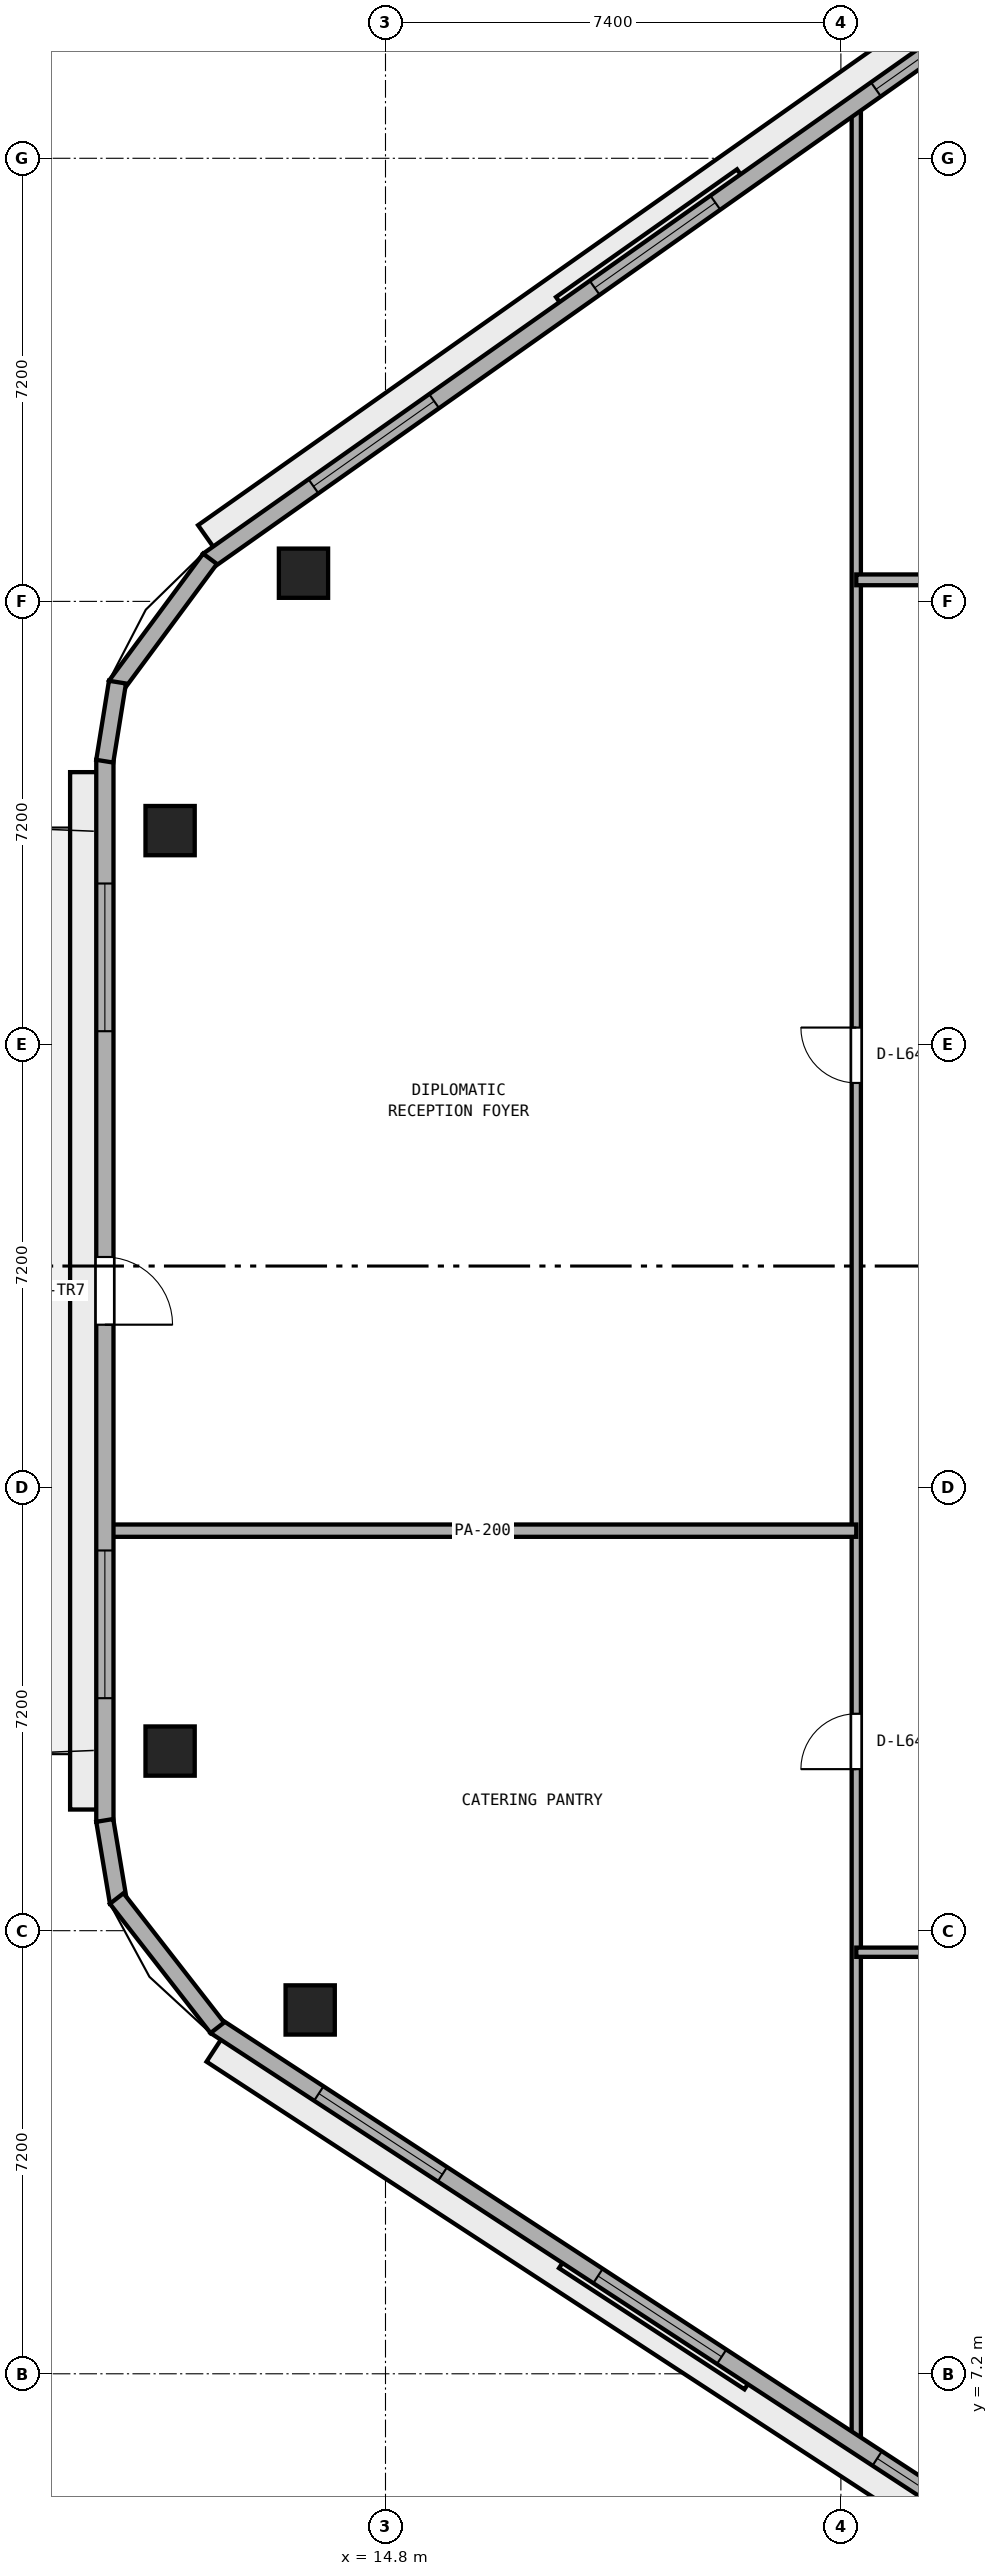
"""IFC4 building model, lengths in metres.
Left out: names, types, materials, properties, quantities, classifications, styles, units other than length and angle.
Written with IfcOpenShell. Run it as: python <this file> out.ifc"""

import sys

from ifc_helpers import new_model, si_unit, direction, frame, frame_2d, origin, origin_2d, place, context, subcontext, project, spatial, rectangle, extrude, element, fill, save


model = new_model("IFC4")
c1 = context("Model", 3, precision=1e-05, world=origin(), true_north=direction((0.0, 1.0)))
c2 = subcontext(c1, "Body", "Model", "MODEL_VIEW")
j1 = project(units=[si_unit("LENGTHUNIT", "METRE"), si_unit("PLANEANGLEUNIT", "RADIAN")], contexts=[c1])
p1 = place(None, origin())
s1 = spatial("IfcSite", under=j1, at=p1, CompositionType="ELEMENT")
p2 = place(p1, origin())
s2 = spatial("IfcBuilding", under=s1, at=p2, CompositionType="ELEMENT")
p3 = place(p2, frame((0.0, 0.0, 251.6)))
s3 = spatial("IfcBuildingStorey", under=s2, at=p3, CompositionType="ELEMENT", Elevation=251.6)
for number, where, z_axis, x_axis in (
    (1, (13.467, 36.458, 0.0), (0.0, 0.0, 1.0), (1.0, 0.0, 0.0)),
    (2, (11.3, 32.275, 0.0), (0.0, 0.0, 1.0), (1.0, 0.0, 0.0)),
    (3, (11.3, 17.319, 0.0), (0.0, 0.0, 1.0), (1.0, 0.0, 0.0)),
    (4, (13.576, 13.112, 0.0), (0.0, 0.0, 1.0), (1.0, 0.0, 0.0)),
):
    element("IfcColumn", number, at=place(p3, frame(where, z_axis=z_axis, x_axis=x_axis)), inside=s3, PredefinedType="COLUMN", context=c2, shape_type="SweptSolid", body=[
        extrude(rectangle(XDim=0.8, YDim=0.8, at=origin_2d()), origin(), (0.0, 0.0, 1.0), 3.8),
    ])
p4 = place(p3, frame((22.45, 6.02, 0.0), z_axis=(0.0, 0.0, 1.0), x_axis=(0.0, 1.0, 0.0)))
e5 = element("IfcWall", 5, at=p4, inside=s3, PredefinedType="PARTITIONING", context=c2, shape_type="SweptSolid", body=[
    extrude(rectangle(XDim=38.106, YDim=0.15, at=frame_2d((19.053, 0.0))), origin(), (0.0, 0.0, 1.0), 3.51),
])
p5 = place(p4, frame((11.005, 0.0, 0.0)))
e6 = element("IfcOpeningElement", 6, at=p5, cuts=e5, PredefinedType="OPENING", context=c2, shape_type="SweptSolid", body=[
    extrude(rectangle(XDim=0.9, YDim=2.1, at=frame_2d((0.45, 1.05))), frame((0.0, 0.085, 0.0), z_axis=(0.0, -1.0, 0.0), x_axis=(1.0, 0.0, 0.0)), (0.0, 0.0, 1.0), 0.17),
])
p6 = place(p4, frame((22.155, 0.0, 0.0)))
e7 = element("IfcOpeningElement", 7, at=p6, cuts=e5, PredefinedType="OPENING", context=c2, shape_type="SweptSolid", body=[
    extrude(rectangle(XDim=0.9, YDim=2.1, at=frame_2d((0.45, 1.05))), frame((0.0, 0.085, 0.0), z_axis=(0.0, -1.0, 0.0), x_axis=(1.0, 0.0, 0.0)), (0.0, 0.0, 1.0), 0.17),
])
p7 = place(p3, frame((22.45, 14.05, 0.0), z_axis=(0.0, 0.0, 1.0), x_axis=(1.0, 0.0, 0.0)))
e8 = element("IfcWall", 8, at=p7, inside=s3, PredefinedType="PARTITIONING", context=c2, shape_type="SweptSolid", body=[
    extrude(rectangle(XDim=13.2, YDim=0.15, at=frame_2d((6.6, 0.0))), origin(), (0.0, 0.0, 1.0), 3.51),
])
p8 = place(p7, frame((6.15, 0.0, 0.0)))
e9 = element("IfcOpeningElement", 9, at=p8, cuts=e8, PredefinedType="OPENING", context=c2, shape_type="SweptSolid", body=[
    extrude(rectangle(XDim=0.9, YDim=2.1, at=frame_2d((0.45, 1.05))), frame((0.0, 0.085, 0.0), z_axis=(0.0, -1.0, 0.0), x_axis=(1.0, 0.0, 0.0)), (0.0, 0.0, 1.0), 0.17),
])
p9 = place(p3, frame((10.305, 20.9, 0.0), z_axis=(0.0, 0.0, 1.0), x_axis=(1.0, 0.0, 0.0)))
e10 = element("IfcWall", 10, at=p9, inside=s3, PredefinedType="PARTITIONING", context=c2, shape_type="SweptSolid", body=[
    extrude(rectangle(XDim=12.145, YDim=0.2, at=frame_2d((6.073, 0.0))), origin(), (0.0, 0.0, 1.0), 3.51),
])
p10 = place(p3, frame((22.45, 36.35, 0.0), z_axis=(0.0, 0.0, 1.0), x_axis=(1.0, 0.0, 0.0)))
e11 = element("IfcWall", 11, at=p10, inside=s3, PredefinedType="PARTITIONING", context=c2, shape_type="SweptSolid", body=[
    extrude(rectangle(XDim=26.15, YDim=0.175, at=frame_2d((13.075, 0.0))), origin(), (0.0, 0.0, 1.0), 3.51),
])
p11 = place(p10, frame((12.575, 0.0, 0.0)))
e12 = element("IfcOpeningElement", 12, at=p11, cuts=e11, PredefinedType="OPENING", context=c2, shape_type="SweptSolid", body=[
    extrude(rectangle(XDim=1.0, YDim=2.12, at=frame_2d((0.5, 1.06))), frame((0.0, 0.097, 0.0), z_axis=(0.0, -1.0, 0.0), x_axis=(1.0, 0.0, 0.0)), (0.0, 0.0, 1.0), 0.195),
])
p12 = place(p3, frame((26.443, 46.913, 0.0), z_axis=(0.0, 0.0, 1.0), x_axis=(-0.817024179766, -0.576603407619, 0.0)))
e13 = element("IfcWall", 13, at=p12, inside=s3, PredefinedType="STANDARD", context=c2, shape_type="SweptSolid", body=[
    extrude(rectangle(XDim=17.78, YDim=0.28, at=frame_2d((8.89, 0.0))), origin(), (0.0, 0.0, 1.0), 3.51),
])
p13 = place(p12, frame((2.097, 0.0, 0.9)))
e14 = element("IfcOpeningElement", 14, at=p13, cuts=e13, PredefinedType="OPENING", context=c2, shape_type="SweptSolid", body=[
    extrude(rectangle(XDim=2.4, YDim=1.75, at=frame_2d((1.2, 0.875))), frame((0.0, 0.15, 0.0), z_axis=(0.0, -1.0, 0.0), x_axis=(1.0, 0.0, 0.0)), (0.0, 0.0, 1.0), 0.3),
])
p14 = place(p12, frame((7.69, 0.0, 0.9)))
e15 = element("IfcOpeningElement", 15, at=p14, cuts=e13, PredefinedType="OPENING", context=c2, shape_type="SweptSolid", body=[
    extrude(rectangle(XDim=2.4, YDim=1.75, at=frame_2d((1.2, 0.875))), frame((0.0, 0.15, 0.0), z_axis=(0.0, -1.0, 0.0), x_axis=(1.0, 0.0, 0.0)), (0.0, 0.0, 1.0), 0.3),
])
p15 = place(p12, frame((13.283, 0.0, 0.9)))
e16 = element("IfcOpeningElement", 16, at=p15, cuts=e13, PredefinedType="OPENING", context=c2, shape_type="SweptSolid", body=[
    extrude(rectangle(XDim=2.4, YDim=1.75, at=frame_2d((1.2, 0.875))), frame((0.0, 0.15, 0.0), z_axis=(0.0, -1.0, 0.0), x_axis=(1.0, 0.0, 0.0)), (0.0, 0.0, 1.0), 0.3),
])
p16 = place(p3, frame((10.24, 33.425, 0.0), z_axis=(0.0, 0.0, 1.0), x_axis=(0.0, -1.0, 0.0)))
e17 = element("IfcWall", 17, at=p16, inside=s3, PredefinedType="STANDARD", context=c2, shape_type="SweptSolid", body=[
    extrude(rectangle(XDim=17.257, YDim=0.28, at=frame_2d((8.628, 0.0))), origin(), (0.0, 0.0, 1.0), 3.51),
])
p17 = place(p16, frame((8.078, 0.0, 0.0)))
e18 = element("IfcOpeningElement", 18, at=p17, cuts=e17, PredefinedType="OPENING", context=c2, shape_type="SweptSolid", body=[
    extrude(rectangle(XDim=1.1, YDim=2.2, at=frame_2d((0.55, 1.1))), frame((0.0, 0.15, 0.0), z_axis=(0.0, -1.0, 0.0), x_axis=(1.0, 0.0, 0.0)), (0.0, 0.0, 1.0), 0.3),
])
p18 = place(p16, frame((2.01, 0.0, 0.9)))
e19 = element("IfcOpeningElement", 19, at=p18, cuts=e17, PredefinedType="OPENING", context=c2, shape_type="SweptSolid", body=[
    extrude(rectangle(XDim=2.4, YDim=1.75, at=frame_2d((1.2, 0.875))), frame((0.0, 0.15, 0.0), z_axis=(0.0, -1.0, 0.0), x_axis=(1.0, 0.0, 0.0)), (0.0, 0.0, 1.0), 0.3),
])
p19 = place(p16, frame((12.847, 0.0, 0.9)))
e20 = element("IfcOpeningElement", 20, at=p19, cuts=e17, PredefinedType="OPENING", context=c2, shape_type="SweptSolid", body=[
    extrude(rectangle(XDim=2.4, YDim=1.75, at=frame_2d((1.2, 0.875))), frame((0.0, 0.15, 0.0), z_axis=(0.0, -1.0, 0.0), x_axis=(1.0, 0.0, 0.0)), (0.0, 0.0, 1.0), 0.3),
])
p20 = place(p3, frame((12.034, 12.854, 0.0), z_axis=(0.0, 0.0, 1.0), x_axis=(0.837118352984, -0.547021812269, 0.0)))
e21 = element("IfcWall", 21, at=p20, inside=s3, PredefinedType="STANDARD", context=c2, shape_type="SweptSolid", body=[
    extrude(rectangle(XDim=17.259, YDim=0.28, at=frame_2d((8.63, 0.0))), origin(), (0.0, 0.0, 1.0), 3.51),
])
p21 = place(p20, frame((2.01, 0.0, 0.9)))
e22 = element("IfcOpeningElement", 22, at=p21, cuts=e21, PredefinedType="OPENING", context=c2, shape_type="SweptSolid", body=[
    extrude(rectangle(XDim=2.4, YDim=1.75, at=frame_2d((1.2, 0.875))), frame((0.0, 0.15, 0.0), z_axis=(0.0, -1.0, 0.0), x_axis=(1.0, 0.0, 0.0)), (0.0, 0.0, 1.0), 0.3),
])
p22 = place(p20, frame((7.43, 0.0, 0.9)))
e23 = element("IfcOpeningElement", 23, at=p22, cuts=e21, PredefinedType="OPENING", context=c2, shape_type="SweptSolid", body=[
    extrude(rectangle(XDim=2.4, YDim=1.75, at=frame_2d((1.2, 0.875))), frame((0.0, 0.15, 0.0), z_axis=(0.0, -1.0, 0.0), x_axis=(1.0, 0.0, 0.0)), (0.0, 0.0, 1.0), 0.3),
])
p23 = place(p20, frame((12.849, 0.0, 0.9)))
e24 = element("IfcOpeningElement", 24, at=p23, cuts=e21, PredefinedType="OPENING", context=c2, shape_type="SweptSolid", body=[
    extrude(rectangle(XDim=2.4, YDim=1.75, at=frame_2d((1.2, 0.875))), frame((0.0, 0.15, 0.0), z_axis=(0.0, -1.0, 0.0), x_axis=(1.0, 0.0, 0.0)), (0.0, 0.0, 1.0), 0.3),
])
p24 = place(p3, frame((11.948, 36.692, 0.0), z_axis=(0.0, 0.0, 1.0), x_axis=(-0.595170751493, -0.803599263668, 0.0)))
e25 = element("IfcWall", 25, at=p24, inside=s3, PredefinedType="STANDARD", context=c2, shape_type="SweptSolid", body=[
    extrude(rectangle(XDim=2.57, YDim=0.28, at=frame_2d((1.285, 0.0))), origin(), (0.0, 0.0, 1.0), 3.51),
])
p25 = place(p3, frame((10.445, 34.688, 0.0), z_axis=(0.0, 0.0, 1.0), x_axis=(-0.158524605336, -0.987355027081, 0.0)))
e26 = element("IfcWall", 26, at=p25, inside=s3, PredefinedType="STANDARD", context=c2, shape_type="SweptSolid", body=[
    extrude(rectangle(XDim=1.301, YDim=0.28, at=frame_2d((0.651, 0.0))), origin(), (0.0, 0.0, 1.0), 3.51),
])
p26 = place(p3, frame((10.238, 16.192, 0.0), z_axis=(0.0, 0.0, 1.0), x_axis=(0.164604311367, -0.986359681191, 0.0)))
e27 = element("IfcWall", 27, at=p26, inside=s3, PredefinedType="STANDARD", context=c2, shape_type="SweptSolid", body=[
    extrude(rectangle(XDim=1.35, YDim=0.28, at=frame_2d((0.675, 0.0))), origin(), (0.0, 0.0, 1.0), 3.51),
])
p27 = place(p3, frame((10.433, 14.923, 0.0), z_axis=(0.0, 0.0, 1.0), x_axis=(0.614181852676, -0.78916452774, 0.0)))
e28 = element("IfcWall", 28, at=p27, inside=s3, PredefinedType="STANDARD", context=c2, shape_type="SweptSolid", body=[
    extrude(rectangle(XDim=2.662, YDim=0.28, at=frame_2d((1.331, 0.0))), origin(), (0.0, 0.0, 1.0), 3.51),
])
p28 = place(p5, origin())
e29 = element("IfcDoor", 29, at=p28, inside=s3, OperationType="SINGLE_SWING_LEFT", PredefinedType="DOOR", context=c2, shape_type="SweptSolid", body=[
    extrude(rectangle(XDim=0.9, YDim=2.1, at=frame_2d((0.45, 1.05))), frame((0.0, 0.025, 0.0), z_axis=(0.0, -1.0, 0.0), x_axis=(1.0, 0.0, 0.0)), (0.0, 0.0, 1.0), 0.05),
])
fill(e6, e29)
p29 = place(p6, origin())
e30 = element("IfcDoor", 30, at=p29, inside=s3, OperationType="SINGLE_SWING_RIGHT", PredefinedType="DOOR", context=c2, shape_type="SweptSolid", body=[
    extrude(rectangle(XDim=0.9, YDim=2.1, at=frame_2d((0.45, 1.05))), frame((0.0, 0.025, 0.0), z_axis=(0.0, -1.0, 0.0), x_axis=(1.0, 0.0, 0.0)), (0.0, 0.0, 1.0), 0.05),
])
fill(e7, e30)
p30 = place(p13, origin())
e31 = element("IfcWindow", 31, at=p30, inside=s3, PartitioningType="SINGLE_PANEL", PredefinedType="WINDOW", context=c2, shape_type="SweptSolid", body=[
    extrude(rectangle(XDim=2.4, YDim=1.75, at=frame_2d((1.2, 0.875))), frame((0.0, 0.03, 0.0), z_axis=(0.0, -1.0, 0.0), x_axis=(1.0, 0.0, 0.0)), (0.0, 0.0, 1.0), 0.06),
])
fill(e14, e31)
p31 = place(p14, origin())
e32 = element("IfcWindow", 32, at=p31, inside=s3, PartitioningType="SINGLE_PANEL", PredefinedType="WINDOW", context=c2, shape_type="SweptSolid", body=[
    extrude(rectangle(XDim=2.4, YDim=1.75, at=frame_2d((1.2, 0.875))), frame((0.0, 0.03, 0.0), z_axis=(0.0, -1.0, 0.0), x_axis=(1.0, 0.0, 0.0)), (0.0, 0.0, 1.0), 0.06),
])
fill(e15, e32)
p32 = place(p15, origin())
e33 = element("IfcWindow", 33, at=p32, inside=s3, PartitioningType="SINGLE_PANEL", PredefinedType="WINDOW", context=c2, shape_type="SweptSolid", body=[
    extrude(rectangle(XDim=2.4, YDim=1.75, at=frame_2d((1.2, 0.875))), frame((0.0, 0.03, 0.0), z_axis=(0.0, -1.0, 0.0), x_axis=(1.0, 0.0, 0.0)), (0.0, 0.0, 1.0), 0.06),
])
fill(e16, e33)
p33 = place(p17, origin())
e34 = element("IfcDoor", 34, at=p33, inside=s3, OperationType="SINGLE_SWING_RIGHT", PredefinedType="DOOR", context=c2, shape_type="SweptSolid", body=[
    extrude(rectangle(XDim=1.1, YDim=2.2, at=frame_2d((0.55, 1.1))), frame((0.0, 0.025, 0.0), z_axis=(0.0, -1.0, 0.0), x_axis=(1.0, 0.0, 0.0)), (0.0, 0.0, 1.0), 0.05),
])
fill(e18, e34)
p34 = place(p18, origin())
e35 = element("IfcWindow", 35, at=p34, inside=s3, PartitioningType="SINGLE_PANEL", PredefinedType="WINDOW", context=c2, shape_type="SweptSolid", body=[
    extrude(rectangle(XDim=2.4, YDim=1.75, at=frame_2d((1.2, 0.875))), frame((0.0, 0.03, 0.0), z_axis=(0.0, -1.0, 0.0), x_axis=(1.0, 0.0, 0.0)), (0.0, 0.0, 1.0), 0.06),
])
fill(e19, e35)
p35 = place(p19, origin())
e36 = element("IfcWindow", 36, at=p35, inside=s3, PartitioningType="SINGLE_PANEL", PredefinedType="WINDOW", context=c2, shape_type="SweptSolid", body=[
    extrude(rectangle(XDim=2.4, YDim=1.75, at=frame_2d((1.2, 0.875))), frame((0.0, 0.03, 0.0), z_axis=(0.0, -1.0, 0.0), x_axis=(1.0, 0.0, 0.0)), (0.0, 0.0, 1.0), 0.06),
])
fill(e20, e36)
p36 = place(p21, origin())
e37 = element("IfcWindow", 37, at=p36, inside=s3, PartitioningType="SINGLE_PANEL", PredefinedType="WINDOW", context=c2, shape_type="SweptSolid", body=[
    extrude(rectangle(XDim=2.4, YDim=1.75, at=frame_2d((1.2, 0.875))), frame((0.0, 0.03, 0.0), z_axis=(0.0, -1.0, 0.0), x_axis=(1.0, 0.0, 0.0)), (0.0, 0.0, 1.0), 0.06),
])
fill(e22, e37)
p37 = place(p22, origin())
e38 = element("IfcWindow", 38, at=p37, inside=s3, PartitioningType="SINGLE_PANEL", PredefinedType="WINDOW", context=c2, shape_type="SweptSolid", body=[
    extrude(rectangle(XDim=2.4, YDim=1.75, at=frame_2d((1.2, 0.875))), frame((0.0, 0.03, 0.0), z_axis=(0.0, -1.0, 0.0), x_axis=(1.0, 0.0, 0.0)), (0.0, 0.0, 1.0), 0.06),
])
fill(e23, e38)
p38 = place(p23, origin())
e39 = element("IfcWindow", 39, at=p38, inside=s3, PartitioningType="SINGLE_PANEL", PredefinedType="WINDOW", context=c2, shape_type="SweptSolid", body=[
    extrude(rectangle(XDim=2.4, YDim=1.75, at=frame_2d((1.2, 0.875))), frame((0.0, 0.03, 0.0), z_axis=(0.0, -1.0, 0.0), x_axis=(1.0, 0.0, 0.0)), (0.0, 0.0, 1.0), 0.06),
])
fill(e24, e39)
save(model, sys.argv[1])
